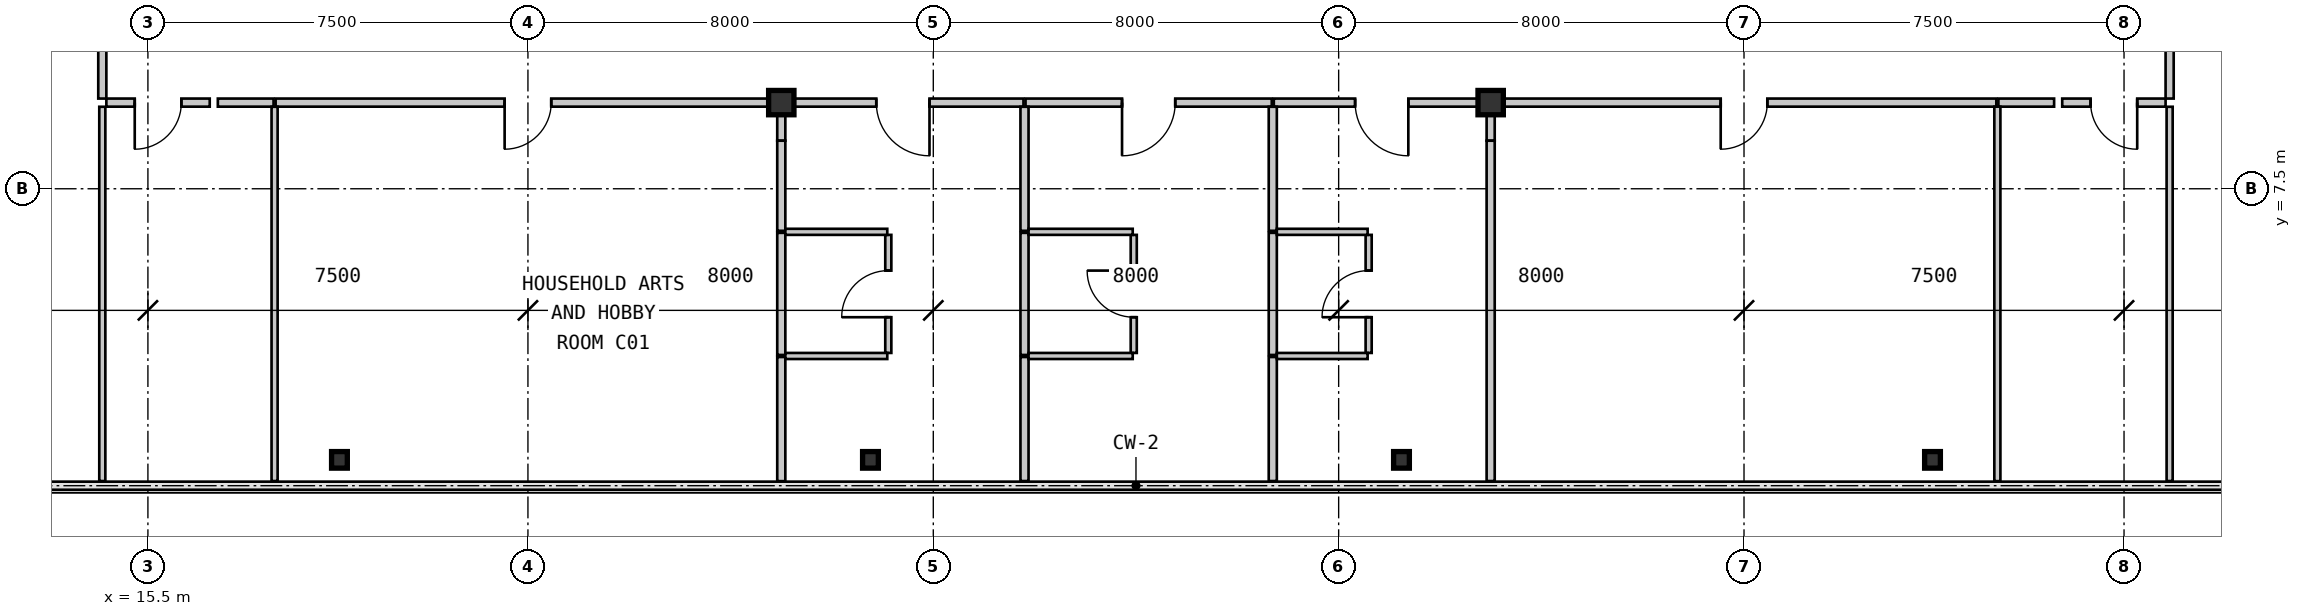
"""IFC4 building model, lengths in metres.
Left out: names, types, materials, properties, quantities, classifications, styles, units other than length and angle.
Written with IfcOpenShell. Run it as: python <this file> out.ifc"""

import sys

from ifc_helpers import new_model, si_unit, direction, frame, frame_2d, origin, origin_2d, place, context, subcontext, project, spatial, rectangle, i_section, extrude, source, transform, mapped, element, fill, save


model = new_model("IFC4")
c1 = context("Model", 3, precision=1e-05, world=origin(), true_north=direction((0.0, 1.0)))
c2 = subcontext(c1, "Body", "Model", "MODEL_VIEW")
j1 = project(units=[si_unit("LENGTHUNIT", "METRE"), si_unit("PLANEANGLEUNIT", "RADIAN")], contexts=[c1])
p1 = place(None, origin())
s1 = spatial("IfcSite", under=j1, at=p1, CompositionType="ELEMENT")
p2 = place(p1, origin())
s2 = spatial("IfcBuilding", under=s1, at=p2, CompositionType="ELEMENT")
p3 = place(p2, frame((0.0, 0.0, 45.15)))
s3 = spatial("IfcBuildingStorey", under=s2, at=p3, CompositionType="ELEMENT", Elevation=45.15)
m1 = source(origin(), c2, "Body", "SweptSolid", [
    extrude(i_section(OverallWidth=0.5, OverallDepth=0.48, WebThickness=0.028, FlangeThickness=0.044, at=origin_2d()), origin(), (0.0, 0.0, 1.0), 3.15),
])
for number, where, z_axis, x_axis in (
    (1, (28.0, 9.2, 0.0), (0.0, 0.0, 1.0), (1.0, 0.0, 0.0)),
    (2, (42.0, 9.2, 0.0), (0.0, 0.0, 1.0), (1.0, 0.0, 0.0)),
):
    element("IfcColumn", number, at=place(p3, frame(where, z_axis=z_axis, x_axis=x_axis)), inside=s3, PredefinedType="COLUMN", context=c2, shape_type="MappedRepresentation", body=[
        mapped(m1, transform((0.0, 0.0, 0.0), scale=1.0)),
    ])
m2 = source(origin(), c2, "Body", "SweptSolid", [
    extrude(i_section(OverallWidth=0.311, OverallDepth=0.327, WebThickness=0.016, FlangeThickness=0.025, at=origin_2d()), origin(), (0.0, 0.0, 1.0), 3.15),
])
for number, where, z_axis, x_axis in (
    (3, (19.28, 2.15, 0.0), (0.0, 0.0, 1.0), (1.0, 0.0, 0.0)),
    (4, (29.76, 2.15, 0.0), (0.0, 0.0, 1.0), (1.0, 0.0, 0.0)),
    (5, (40.24, 2.15, 0.0), (0.0, 0.0, 1.0), (1.0, 0.0, 0.0)),
    (6, (50.72, 2.15, 0.0), (0.0, 0.0, 1.0), (1.0, 0.0, 0.0)),
):
    element("IfcColumn", number, at=place(p3, frame(where, z_axis=z_axis, x_axis=x_axis)), inside=s3, PredefinedType="COLUMN", context=c2, shape_type="MappedRepresentation", body=[
        mapped(m2, transform((0.0, 0.0, 0.0), scale=1.0)),
    ])
m3 = source(origin(), c2, "Body", "SweptSolid", [
    extrude(rectangle(XDim=2.04, YDim=0.16, at=frame_2d((1.02, 0.0))), origin(), (0.0, 0.0, 1.0), 2.93),
])
p4 = place(p3, frame((16.72, 9.2, 0.0), z_axis=(0.0, 0.0, 1.0), x_axis=(-1.0, 0.0, 0.0)))
e7 = element("IfcWall", 7, at=p4, inside=s3, PredefinedType="PARTITIONING", context=c2, shape_type="MappedRepresentation", body=[
    mapped(m3, transform((0.0, 0.0, 0.0), scale=1.0)),
])
m4 = source(origin(), c2, "Body", "SweptSolid", [
    extrude(rectangle(XDim=0.92, YDim=2.1, at=frame_2d((0.46, 1.05))), frame((0.0, 0.09, 0.0), z_axis=(0.0, -1.0, 0.0), x_axis=(1.0, 0.0, 0.0)), (0.0, 0.0, 1.0), 0.18),
])
p5 = place(p4, frame((0.56, 0.0, 0.0)))
e8 = element("IfcOpeningElement", 8, at=p5, cuts=e7, PredefinedType="OPENING", context=c2, shape_type="MappedRepresentation", body=[
    mapped(m4, transform((0.0, 0.0, 0.0), scale=1.0)),
])
p6 = place(p3, frame((55.32, 9.2, 0.0), z_axis=(0.0, 0.0, 1.0), x_axis=(-1.0, 0.0, 0.0)))
e9 = element("IfcWall", 9, at=p6, inside=s3, PredefinedType="PARTITIONING", context=c2, shape_type="MappedRepresentation", body=[
    mapped(m3, transform((0.0, 0.0, 0.0), scale=1.0)),
])
p7 = place(p6, frame((0.56, 0.0, 0.0)))
e10 = element("IfcOpeningElement", 10, at=p7, cuts=e9, PredefinedType="OPENING", context=c2, shape_type="MappedRepresentation", body=[
    mapped(m4, transform((0.0, 0.0, 0.0), scale=1.0)),
])
m5 = source(origin(), c2, "Body", "SweptSolid", [
    extrude(rectangle(XDim=6.9, YDim=0.16, at=frame_2d((3.45, 0.0))), origin(), (0.0, 0.0, 1.0), 2.93),
])
p8 = place(p3, frame((14.6, 9.28, 0.0), z_axis=(0.0, 0.0, 1.0), x_axis=(0.0, 1.0, 0.0)))
e11 = element("IfcWall", 11, at=p8, inside=s3, PredefinedType="PARTITIONING", context=c2, shape_type="MappedRepresentation", body=[
    mapped(m5, transform((0.0, 0.0, 0.0), scale=1.0)),
])
p9 = place(p8, frame((2.99, 0.0, 0.0)))
e12 = element("IfcOpeningElement", 12, at=p9, cuts=e11, PredefinedType="OPENING", context=c2, shape_type="MappedRepresentation", body=[
    mapped(m4, transform((0.0, 0.0, 0.0), scale=1.0)),
])
m6 = source(origin(), c2, "Body", "SweptSolid", [
    extrude(rectangle(XDim=7.5, YDim=0.16, at=frame_2d((3.75, 0.0))), origin(), (0.0, 0.0, 1.0), 2.93),
])
p10 = place(p3, frame((55.4, 16.78, 0.0), z_axis=(0.0, 0.0, 1.0), x_axis=(0.0, -1.0, 0.0)))
e13 = element("IfcWall", 13, at=p10, inside=s3, PredefinedType="PARTITIONING", context=c2, shape_type="MappedRepresentation", body=[
    mapped(m6, transform((0.0, 0.0, 0.0), scale=1.0)),
])
p11 = place(p10, frame((3.29, 0.0, 0.0)))
e14 = element("IfcOpeningElement", 14, at=p11, cuts=e13, PredefinedType="OPENING", context=c2, shape_type="MappedRepresentation", body=[
    mapped(m4, transform((0.0, 0.0, 0.0), scale=1.0)),
])
m7 = source(origin(), c2, "Body", "SweptSolid", [
    extrude(rectangle(XDim=1.1, YDim=0.16, at=frame_2d((0.55, 0.0))), origin(), (0.0, 0.0, 1.0), 2.93),
])
p12 = place(p3, frame((17.98, 9.2, 0.0), z_axis=(0.0, 0.0, 1.0), x_axis=(-1.0, 0.0, 0.0)))
e15 = element("IfcWall", 15, at=p12, inside=s3, PredefinedType="PARTITIONING", context=c2, shape_type="MappedRepresentation", body=[
    mapped(m7, transform((0.0, 0.0, 0.0), scale=1.0)),
])
m8 = source(origin(), c2, "Body", "SweptSolid", [
    extrude(rectangle(XDim=9.959, YDim=0.16, at=frame_2d((4.98, 0.0))), origin(), (0.0, 0.0, 1.0), 2.93),
])
p13 = place(p3, frame((27.98, 9.2, 0.0), z_axis=(0.0, 0.0, 1.0), x_axis=(-1.0, 0.0, 0.0)))
e16 = element("IfcWall", 16, at=p13, inside=s3, PredefinedType="PARTITIONING", context=c2, shape_type="MappedRepresentation", body=[
    mapped(m8, transform((0.0, 0.0, 0.0), scale=1.0)),
])
p14 = place(p13, frame((4.52, 0.0, 0.0)))
e17 = element("IfcOpeningElement", 17, at=p14, cuts=e16, PredefinedType="OPENING", context=c2, shape_type="MappedRepresentation", body=[
    mapped(m4, transform((0.0, 0.0, 0.0), scale=1.0)),
])
m9 = source(origin(), c2, "Body", "SweptSolid", [
    extrude(rectangle(XDim=4.76, YDim=0.16, at=frame_2d((2.38, 0.0))), origin(), (0.0, 0.0, 1.0), 2.328),
])
p15 = place(p3, frame((32.78, 9.2, 0.0), z_axis=(0.0, 0.0, 1.0), x_axis=(-1.0, 0.0, 0.0)))
e18 = element("IfcWall", 18, at=p15, inside=s3, PredefinedType="PARTITIONING", context=c2, shape_type="MappedRepresentation", body=[
    mapped(m9, transform((0.0, 0.0, 0.0), scale=1.0)),
])
m10 = source(origin(), c2, "Body", "SweptSolid", [
    extrude(rectangle(XDim=1.05, YDim=2.1, at=frame_2d((0.525, 1.05))), frame((0.0, 0.09, 0.0), z_axis=(0.0, -1.0, 0.0), x_axis=(1.0, 0.0, 0.0)), (0.0, 0.0, 1.0), 0.18),
])
p16 = place(p15, frame((1.855, 0.0, 0.0)))
e19 = element("IfcOpeningElement", 19, at=p16, cuts=e18, PredefinedType="OPENING", context=c2, shape_type="MappedRepresentation", body=[
    mapped(m10, transform((0.0, 0.0, 0.0), scale=1.0)),
])
m11 = source(origin(), c2, "Body", "SweptSolid", [
    extrude(rectangle(XDim=4.859, YDim=0.16, at=frame_2d((2.43, 0.0))), origin(), (0.0, 0.0, 1.0), 2.328),
])
p17 = place(p3, frame((37.68, 9.2, 0.0), z_axis=(0.0, 0.0, 1.0), x_axis=(-1.0, 0.0, 0.0)))
e20 = element("IfcWall", 20, at=p17, inside=s3, PredefinedType="PARTITIONING", context=c2, shape_type="MappedRepresentation", body=[
    mapped(m11, transform((0.0, 0.0, 0.0), scale=1.0)),
])
p18 = place(p17, frame((1.905, 0.0, 0.0)))
e21 = element("IfcOpeningElement", 21, at=p18, cuts=e20, PredefinedType="OPENING", context=c2, shape_type="MappedRepresentation", body=[
    mapped(m10, transform((0.0, 0.0, 0.0), scale=1.0)),
])
m12 = source(origin(), c2, "Body", "SweptSolid", [
    extrude(rectangle(XDim=4.26, YDim=0.16, at=frame_2d((2.13, 0.0))), origin(), (0.0, 0.0, 1.0), 2.328),
])
p19 = place(p3, frame((41.98, 9.2, 0.0), z_axis=(0.0, 0.0, 1.0), x_axis=(-1.0, 0.0, 0.0)))
e22 = element("IfcWall", 22, at=p19, inside=s3, PredefinedType="PARTITIONING", context=c2, shape_type="MappedRepresentation", body=[
    mapped(m12, transform((0.0, 0.0, 0.0), scale=1.0)),
])
p20 = place(p19, frame((1.605, 0.0, 0.0)))
e23 = element("IfcOpeningElement", 23, at=p20, cuts=e22, PredefinedType="OPENING", context=c2, shape_type="MappedRepresentation", body=[
    mapped(m10, transform((0.0, 0.0, 0.0), scale=1.0)),
])
p21 = place(p3, frame((51.98, 9.2, 0.0), z_axis=(0.0, 0.0, 1.0), x_axis=(-1.0, 0.0, 0.0)))
e24 = element("IfcWall", 24, at=p21, inside=s3, PredefinedType="PARTITIONING", context=c2, shape_type="MappedRepresentation", body=[
    mapped(m8, transform((0.0, 0.0, 0.0), scale=1.0)),
])
p22 = place(p21, frame((4.52, 0.0, 0.0)))
e25 = element("IfcOpeningElement", 25, at=p22, cuts=e24, PredefinedType="OPENING", context=c2, shape_type="MappedRepresentation", body=[
    mapped(m4, transform((0.0, 0.0, 0.0), scale=1.0)),
])
p23 = place(p3, frame((53.12, 9.2, 0.0), z_axis=(0.0, 0.0, 1.0), x_axis=(-1.0, 0.0, 0.0)))
e26 = element("IfcWall", 26, at=p23, inside=s3, PredefinedType="PARTITIONING", context=c2, shape_type="MappedRepresentation", body=[
    mapped(m7, transform((0.0, 0.0, 0.0), scale=1.0)),
])
m13 = source(origin(), c2, "Body", "SweptSolid", [
    extrude(rectangle(XDim=7.386, YDim=0.12, at=frame_2d((3.693, 0.0))), origin(), (0.0, 0.0, 1.0), 2.93),
])
for number, where, z_axis, x_axis in (
    (27, (18.0, 9.118, 0.0), (0.0, 0.0, 1.0), (0.0, -1.0, 0.0)),
    (28, (14.6, 1.732, 0.0), (0.0, 0.0, 1.0), (0.0, 1.0, 0.0)),
):
    element("IfcWall", number, at=place(p3, frame(where, z_axis=z_axis, x_axis=x_axis)), inside=s3, PredefinedType="PARTITIONING", context=c2, shape_type="MappedRepresentation", body=[
        mapped(m13, transform((0.0, 0.0, 0.0), scale=1.0)),
    ])
m14 = source(origin(), c2, "Body", "SweptSolid", [
    extrude(rectangle(XDim=2.45, YDim=0.16, at=frame_2d((1.225, 0.0))), origin(), (0.0, 0.0, 1.0), 2.93),
])
p24 = place(p3, frame((28.0, 4.18, 0.0), z_axis=(0.0, 0.0, 1.0), x_axis=(0.0, -1.0, 0.0)))
e29 = element("IfcWall", 29, at=p24, inside=s3, PredefinedType="PARTITIONING", context=c2, shape_type="MappedRepresentation", body=[
    mapped(m14, transform((0.0, 0.0, 0.0), scale=1.0)),
])
m15 = source(origin(), c2, "Body", "SweptSolid", [
    extrude(rectangle(XDim=0.672, YDim=0.16, at=frame_2d((0.336, 0.0))), origin(), (0.0, 0.0, 1.0), 2.397),
])
p25 = place(p3, frame((28.0, 9.12, 0.0), z_axis=(0.0, 0.0, 1.0), x_axis=(0.0, -1.0, 0.0)))
e30 = element("IfcWall", 30, at=p25, inside=s3, PredefinedType="PARTITIONING", context=c2, shape_type="MappedRepresentation", body=[
    mapped(m15, transform((0.0, 0.0, 0.0), scale=1.0)),
])
m16 = source(origin(), c2, "Body", "SweptSolid", [
    extrude(rectangle(XDim=1.778, YDim=0.16, at=frame_2d((0.889, 0.0))), origin(), (0.0, 0.0, 1.0), 2.93),
])
p26 = place(p3, frame((28.0, 8.448, 0.0), z_axis=(0.0, 0.0, 1.0), x_axis=(0.0, -1.0, 0.0)))
e31 = element("IfcWall", 31, at=p26, inside=s3, PredefinedType="PARTITIONING", context=c2, shape_type="MappedRepresentation", body=[
    mapped(m16, transform((0.0, 0.0, 0.0), scale=1.0)),
])
m17 = source(origin(), c2, "Body", "SweptSolid", [
    extrude(rectangle(XDim=2.41, YDim=0.16, at=frame_2d((1.205, 0.0))), origin(), (0.0, 0.0, 1.0), 2.93),
])
p27 = place(p3, frame((28.0, 6.63, 0.0), z_axis=(0.0, 0.0, 1.0), x_axis=(0.0, -1.0, 0.0)))
e32 = element("IfcWall", 32, at=p27, inside=s3, PredefinedType="PARTITIONING", context=c2, shape_type="MappedRepresentation", body=[
    mapped(m17, transform((0.0, 0.0, 0.0), scale=1.0)),
])
m18 = source(origin(), c2, "Body", "SweptSolid", [
    extrude(rectangle(XDim=2.33, YDim=0.12, at=frame_2d((1.165, 0.0))), origin(), (0.0, 0.0, 1.0), 2.93),
])
p28 = place(p3, frame((30.112, 4.26, 0.0), z_axis=(0.0, 0.0, 1.0), x_axis=(0.0, 1.0, 0.0)))
e33 = element("IfcWall", 33, at=p28, inside=s3, PredefinedType="PARTITIONING", context=c2, shape_type="MappedRepresentation", body=[
    mapped(m18, transform((0.0, 0.0, 0.0), scale=1.0)),
])
m19 = source(origin(), c2, "Body", "SweptSolid", [
    extrude(rectangle(XDim=0.92, YDim=2.1, at=frame_2d((0.46, 1.05))), frame((0.0, 0.07, 0.0), z_axis=(0.0, -1.0, 0.0), x_axis=(1.0, 0.0, 0.0)), (0.0, 0.0, 1.0), 0.14),
])
p29 = place(p28, frame((0.705, 0.0, 0.0)))
e34 = element("IfcOpeningElement", 34, at=p29, cuts=e33, PredefinedType="OPENING", context=c2, shape_type="MappedRepresentation", body=[
    mapped(m19, transform((0.0, 0.0, 0.0), scale=1.0)),
])
m20 = source(origin(), c2, "Body", "SweptSolid", [
    extrude(rectangle(XDim=2.012, YDim=0.12, at=frame_2d((1.006, 0.0))), origin(), (0.0, 0.0, 1.0), 2.93),
])
for number, where, z_axis, x_axis in (
    (35, (28.08, 4.2, 0.0), (0.0, 0.0, 1.0), (1.0, 0.0, 0.0)),
    (36, (30.092, 6.65, 0.0), (0.0, 0.0, 1.0), (-1.0, 0.0, 0.0)),
):
    element("IfcWall", number, at=place(p3, frame(where, z_axis=z_axis, x_axis=x_axis)), inside=s3, PredefinedType="PARTITIONING", context=c2, shape_type="MappedRepresentation", body=[
        mapped(m20, transform((0.0, 0.0, 0.0), scale=1.0)),
    ])
m21 = source(origin(), c2, "Body", "SweptSolid", [
    extrude(rectangle(XDim=2.448, YDim=0.16, at=frame_2d((1.224, 0.0))), origin(), (0.0, 0.0, 1.0), 2.93),
])
for number, where, z_axis, x_axis in (
    (37, (32.8, 4.18, 0.0), (0.0, 0.0, 1.0), (0.0, -1.0, 0.0)),
    (38, (32.8, 9.118, 0.0), (0.0, 0.0, 1.0), (0.0, -1.0, 0.0)),
):
    element("IfcWall", number, at=place(p3, frame(where, z_axis=z_axis, x_axis=x_axis)), inside=s3, PredefinedType="PARTITIONING", context=c2, shape_type="MappedRepresentation", body=[
        mapped(m21, transform((0.0, 0.0, 0.0), scale=1.0)),
    ])
p30 = place(p3, frame((32.8, 6.63, 0.0), z_axis=(0.0, 0.0, 1.0), x_axis=(0.0, -1.0, 0.0)))
e39 = element("IfcWall", 39, at=p30, inside=s3, PredefinedType="PARTITIONING", context=c2, shape_type="MappedRepresentation", body=[
    mapped(m17, transform((0.0, 0.0, 0.0), scale=1.0)),
])
p31 = place(p3, frame((34.956, 4.26, 0.0), z_axis=(0.0, 0.0, 1.0), x_axis=(0.0, 1.0, 0.0)))
e40 = element("IfcWall", 40, at=p31, inside=s3, PredefinedType="PARTITIONING", context=c2, shape_type="MappedRepresentation", body=[
    mapped(m18, transform((0.0, 0.0, 0.0), scale=1.0)),
])
p32 = place(p31, frame((0.705, 0.0, 0.0)))
e41 = element("IfcOpeningElement", 41, at=p32, cuts=e40, PredefinedType="OPENING", context=c2, shape_type="MappedRepresentation", body=[
    mapped(m19, transform((0.0, 0.0, 0.0), scale=1.0)),
])
m22 = source(origin(), c2, "Body", "SweptSolid", [
    extrude(rectangle(XDim=2.056, YDim=0.12, at=frame_2d((1.028, 0.0))), origin(), (0.0, 0.0, 1.0), 2.93),
])
for number, where, z_axis, x_axis in (
    (42, (32.88, 4.2, 0.0), (0.0, 0.0, 1.0), (1.0, 0.0, 0.0)),
    (43, (34.936, 6.65, 0.0), (0.0, 0.0, 1.0), (-1.0, 0.0, 0.0)),
):
    element("IfcWall", number, at=place(p3, frame(where, z_axis=z_axis, x_axis=x_axis)), inside=s3, PredefinedType="PARTITIONING", context=c2, shape_type="MappedRepresentation", body=[
        mapped(m22, transform((0.0, 0.0, 0.0), scale=1.0)),
    ])
for number, where, z_axis, x_axis in (
    (44, (37.7, 4.18, 0.0), (0.0, 0.0, 1.0), (0.0, -1.0, 0.0)),
    (45, (37.7, 9.118, 0.0), (0.0, 0.0, 1.0), (0.0, -1.0, 0.0)),
):
    element("IfcWall", number, at=place(p3, frame(where, z_axis=z_axis, x_axis=x_axis)), inside=s3, PredefinedType="PARTITIONING", context=c2, shape_type="MappedRepresentation", body=[
        mapped(m21, transform((0.0, 0.0, 0.0), scale=1.0)),
    ])
p33 = place(p3, frame((37.7, 6.63, 0.0), z_axis=(0.0, 0.0, 1.0), x_axis=(0.0, -1.0, 0.0)))
e46 = element("IfcWall", 46, at=p33, inside=s3, PredefinedType="PARTITIONING", context=c2, shape_type="MappedRepresentation", body=[
    mapped(m17, transform((0.0, 0.0, 0.0), scale=1.0)),
])
p34 = place(p3, frame((39.592, 4.26, 0.0), z_axis=(0.0, 0.0, 1.0), x_axis=(0.0, 1.0, 0.0)))
e47 = element("IfcWall", 47, at=p34, inside=s3, PredefinedType="PARTITIONING", context=c2, shape_type="MappedRepresentation", body=[
    mapped(m18, transform((0.0, 0.0, 0.0), scale=1.0)),
])
p35 = place(p34, frame((0.705, 0.0, 0.0)))
e48 = element("IfcOpeningElement", 48, at=p35, cuts=e47, PredefinedType="OPENING", context=c2, shape_type="MappedRepresentation", body=[
    mapped(m19, transform((0.0, 0.0, 0.0), scale=1.0)),
])
m23 = source(origin(), c2, "Body", "SweptSolid", [
    extrude(rectangle(XDim=1.792, YDim=0.12, at=frame_2d((0.896, 0.0))), origin(), (0.0, 0.0, 1.0), 2.93),
])
for number, where, z_axis, x_axis in (
    (49, (37.78, 4.2, 0.0), (0.0, 0.0, 1.0), (1.0, 0.0, 0.0)),
    (50, (39.572, 6.65, 0.0), (0.0, 0.0, 1.0), (-1.0, 0.0, 0.0)),
):
    element("IfcWall", number, at=place(p3, frame(where, z_axis=z_axis, x_axis=x_axis)), inside=s3, PredefinedType="PARTITIONING", context=c2, shape_type="MappedRepresentation", body=[
        mapped(m23, transform((0.0, 0.0, 0.0), scale=1.0)),
    ])
m24 = source(origin(), c2, "Body", "SweptSolid", [
    extrude(rectangle(XDim=0.67, YDim=0.16, at=frame_2d((0.335, 0.0))), origin(), (0.0, 0.0, 1.0), 2.397),
])
p36 = place(p3, frame((42.0, 9.118, 0.0), z_axis=(0.0, 0.0, 1.0), x_axis=(0.0, -1.0, 0.0)))
e51 = element("IfcWall", 51, at=p36, inside=s3, PredefinedType="PARTITIONING", context=c2, shape_type="MappedRepresentation", body=[
    mapped(m24, transform((0.0, 0.0, 0.0), scale=1.0)),
])
m25 = source(origin(), c2, "Body", "SweptSolid", [
    extrude(rectangle(XDim=6.716, YDim=0.16, at=frame_2d((3.358, 0.0))), origin(), (0.0, 0.0, 1.0), 2.93),
])
p37 = place(p3, frame((42.0, 8.448, 0.0), z_axis=(0.0, 0.0, 1.0), x_axis=(0.0, -1.0, 0.0)))
e52 = element("IfcWall", 52, at=p37, inside=s3, PredefinedType="PARTITIONING", context=c2, shape_type="MappedRepresentation", body=[
    mapped(m25, transform((0.0, 0.0, 0.0), scale=1.0)),
])
m26 = source(origin(), c2, "Body", "SweptSolid", [
    extrude(rectangle(XDim=7.39, YDim=0.12, at=frame_2d((3.695, 0.0))), origin(), (0.0, 0.0, 1.0), 2.93),
])
p38 = place(p3, frame((52.0, 9.12, 0.0), z_axis=(0.0, 0.0, 1.0), x_axis=(0.0, -1.0, 0.0)))
e53 = element("IfcWall", 53, at=p38, inside=s3, PredefinedType="PARTITIONING", context=c2, shape_type="MappedRepresentation", body=[
    mapped(m26, transform((0.0, 0.0, 0.0), scale=1.0)),
])
p39 = place(p3, frame((55.4, 9.118, 0.0), z_axis=(0.0, 0.0, 1.0), x_axis=(0.0, -1.0, 0.0)))
e54 = element("IfcWall", 54, at=p39, inside=s3, PredefinedType="PARTITIONING", context=c2, shape_type="MappedRepresentation", body=[
    mapped(m13, transform((0.0, 0.0, 0.0), scale=1.0)),
])
m27 = source(origin(), c2, "Body", "SweptSolid", [
    extrude(rectangle(XDim=0.92, YDim=2.1, at=frame_2d((0.46, 1.05))), frame((0.0, 0.025, 0.0), z_axis=(0.0, -1.0, 0.0), x_axis=(1.0, 0.0, 0.0)), (0.0, 0.0, 1.0), 0.05),
])
p40 = place(p5, origin())
e55 = element("IfcDoor", 55, at=p40, inside=s3, OperationType="SINGLE_SWING_RIGHT", PredefinedType="DOOR", context=c2, shape_type="MappedRepresentation", body=[
    mapped(m27, transform((0.0, 0.0, 0.0), scale=1.0)),
])
fill(e8, e55)
p41 = place(p7, origin())
e56 = element("IfcDoor", 56, at=p41, inside=s3, OperationType="SINGLE_SWING_LEFT", PredefinedType="DOOR", context=c2, shape_type="MappedRepresentation", body=[
    mapped(m27, transform((0.0, 0.0, 0.0), scale=1.0)),
])
fill(e10, e56)
p42 = place(p14, origin())
e57 = element("IfcDoor", 57, at=p42, inside=s3, OperationType="SINGLE_SWING_RIGHT", PredefinedType="DOOR", context=c2, shape_type="MappedRepresentation", body=[
    mapped(m27, transform((0.0, 0.0, 0.0), scale=1.0)),
])
fill(e17, e57)
m28 = source(origin(), c2, "Body", "SweptSolid", [
    extrude(rectangle(XDim=1.05, YDim=2.1, at=frame_2d((0.525, 1.05))), frame((0.0, 0.025, 0.0), z_axis=(0.0, -1.0, 0.0), x_axis=(1.0, 0.0, 0.0)), (0.0, 0.0, 1.0), 0.05),
])
p43 = place(p16, origin())
e58 = element("IfcDoor", 58, at=p43, inside=s3, OperationType="SINGLE_SWING_LEFT", PredefinedType="DOOR", context=c2, shape_type="MappedRepresentation", body=[
    mapped(m28, transform((0.0, 0.0, 0.0), scale=1.0)),
])
fill(e19, e58)
p44 = place(p18, origin())
e59 = element("IfcDoor", 59, at=p44, inside=s3, OperationType="SINGLE_SWING_RIGHT", PredefinedType="DOOR", context=c2, shape_type="MappedRepresentation", body=[
    mapped(m28, transform((0.0, 0.0, 0.0), scale=1.0)),
])
fill(e21, e59)
p45 = place(p20, origin())
e60 = element("IfcDoor", 60, at=p45, inside=s3, OperationType="SINGLE_SWING_LEFT", PredefinedType="DOOR", context=c2, shape_type="MappedRepresentation", body=[
    mapped(m28, transform((0.0, 0.0, 0.0), scale=1.0)),
])
fill(e23, e60)
p46 = place(p22, origin())
e61 = element("IfcDoor", 61, at=p46, inside=s3, OperationType="SINGLE_SWING_RIGHT", PredefinedType="DOOR", context=c2, shape_type="MappedRepresentation", body=[
    mapped(m27, transform((0.0, 0.0, 0.0), scale=1.0)),
])
fill(e25, e61)
p47 = place(p29, origin())
e62 = element("IfcDoor", 62, at=p47, inside=s3, OperationType="SINGLE_SWING_LEFT", PredefinedType="DOOR", context=c2, shape_type="MappedRepresentation", body=[
    mapped(m27, transform((0.0, 0.0, 0.0), scale=1.0)),
])
fill(e34, e62)
p48 = place(p32, origin())
e63 = element("IfcDoor", 63, at=p48, inside=s3, OperationType="SINGLE_SWING_RIGHT", PredefinedType="DOOR", context=c2, shape_type="MappedRepresentation", body=[
    mapped(m27, transform((0.0, 0.0, 0.0), scale=1.0)),
])
fill(e41, e63)
p49 = place(p35, origin())
e64 = element("IfcDoor", 64, at=p49, inside=s3, OperationType="SINGLE_SWING_LEFT", PredefinedType="DOOR", context=c2, shape_type="MappedRepresentation", body=[
    mapped(m27, transform((0.0, 0.0, 0.0), scale=1.0)),
])
fill(e48, e64)
save(model, sys.argv[1])
